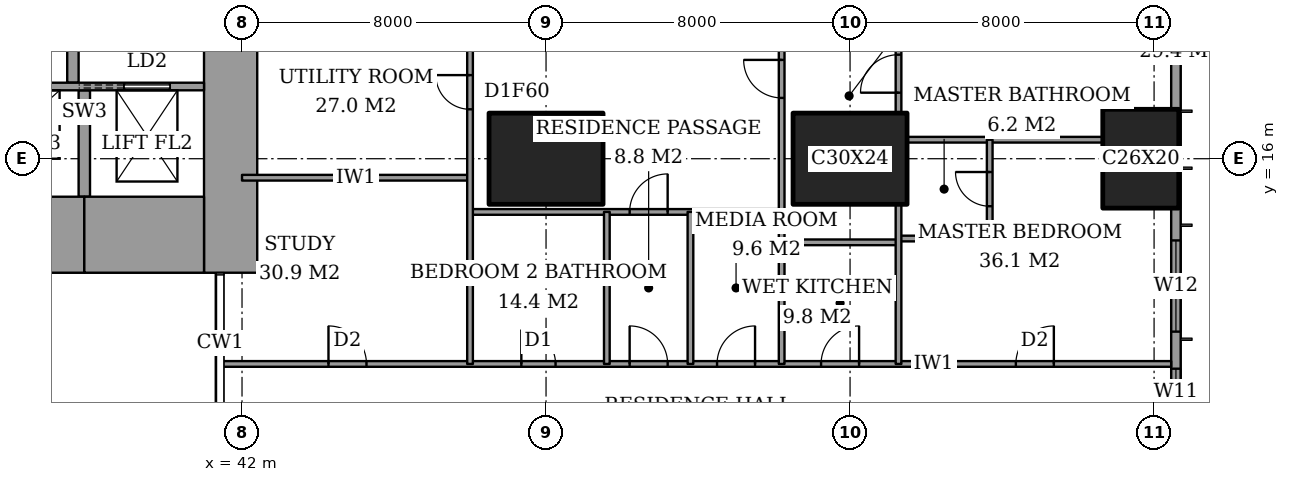
"""IFC4 building model, lengths in metres.
Left out: names, types, materials, properties, quantities, classifications, styles, units other than length and angle.
Written with IfcOpenShell. Run it as: python <this file> out.ifc"""

import sys

from ifc_helpers import new_model, si_unit, direction, frame, frame_2d, origin, origin_2d, place, context, subcontext, project, spatial, rectangle, extrude, element, fill, save


model = new_model("IFC4")
c1 = context("Model", 3, precision=1e-05, world=origin(), true_north=direction((0.0, 1.0)))
c2 = subcontext(c1, "Body", "Model", "MODEL_VIEW")
j1 = project(units=[si_unit("LENGTHUNIT", "METRE"), si_unit("PLANEANGLEUNIT", "RADIAN")], contexts=[c1])
p1 = place(None, origin())
s1 = spatial("IfcSite", under=j1, at=p1, CompositionType="ELEMENT")
p2 = place(p1, origin())
s2 = spatial("IfcBuilding", under=s1, at=p2, CompositionType="ELEMENT")
p3 = place(p2, frame((0.0, 0.0, 110.6)))
s3 = spatial("IfcBuildingStorey", under=s2, at=p3, CompositionType="ELEMENT", Elevation=110.6)
for number, where, z_axis, x_axis in (
    (1, (50.0, 16.0, 0.0), (0.0, 0.0, 1.0), (1.0, 0.0, 0.0)),
    (2, (58.0, 16.0, 0.0), (0.0, 0.0, 1.0), (1.0, 0.0, 0.0)),
):
    element("IfcColumn", number, at=place(p3, frame(where, z_axis=z_axis, x_axis=x_axis)), inside=s3, PredefinedType="COLUMN", context=c2, shape_type="SweptSolid", body=[
        extrude(rectangle(XDim=3.0, YDim=2.4, at=origin_2d()), origin(), (0.0, 0.0, 1.0), 3.6),
    ])
p4 = place(p3, frame((65.65, 16.0, 0.0), z_axis=(0.0, 0.0, 1.0), x_axis=(0.0, 1.0, 0.0)))
e3 = element("IfcColumn", 3, at=p4, inside=s3, PredefinedType="COLUMN", context=c2, shape_type="SweptSolid", body=[
    extrude(rectangle(XDim=2.6, YDim=2.0, at=origin_2d()), origin(), (0.0, 0.0, 1.0), 3.6),
])
p5 = place(p3, frame((28.15, 14.0, 0.0), z_axis=(0.0, 0.0, 1.0), x_axis=(1.0, 0.0, 0.0)))
e4 = element("IfcWall", 4, at=p5, inside=s3, PredefinedType="SHEAR", context=c2, shape_type="SweptSolid", body=[
    extrude(rectangle(XDim=9.7, YDim=2.0, at=frame_2d((4.85, 0.0))), origin(), (0.0, 0.0, 1.0), 3.6),
])
p6 = place(p3, frame((37.85, 14.0, 0.0), z_axis=(0.0, 0.0, 1.0), x_axis=(1.0, 0.0, 0.0)))
e5 = element("IfcWall", 5, at=p6, inside=s3, PredefinedType="SHEAR", context=c2, shape_type="SweptSolid", body=[
    extrude(rectangle(XDim=3.15, YDim=2.0, at=frame_2d((1.575, 0.0))), origin(), (0.0, 0.0, 1.0), 3.6),
])
p7 = place(p3, frame((41.7, 13.0, 0.0), z_axis=(0.0, 0.0, 1.0), x_axis=(0.0, 1.0, 0.0)))
e6 = element("IfcWall", 6, at=p7, inside=s3, PredefinedType="SHEAR", context=c2, shape_type="SweptSolid", body=[
    extrude(rectangle(XDim=11.85, YDim=1.4, at=frame_2d((5.925, 0.0))), origin(), (0.0, 0.0, 1.0), 3.6),
])
p8 = place(p7, frame((7.5, 0.0, 0.0)))
e7 = element("IfcOpeningElement", 7, at=p8, cuts=e6, PredefinedType="OPENING", context=c2, shape_type="SweptSolid", body=[
    extrude(rectangle(XDim=1.8, YDim=2.4, at=frame_2d((0.9, 1.2))), frame((0.0, 0.71, 0.0), z_axis=(0.0, -1.0, 0.0), x_axis=(1.0, 0.0, 0.0)), (0.0, 0.0, 1.0), 1.42),
])
p9 = place(p3, frame((37.55, 18.0, 0.0), z_axis=(0.0, 0.0, 1.0), x_axis=(0.0, 1.0, 0.0)))
e8 = element("IfcWall", 8, at=p9, inside=s3, PredefinedType="PARTITIONING", context=c2, shape_type="SweptSolid", body=[
    extrude(rectangle(XDim=6.7, YDim=0.3, at=frame_2d((3.35, 0.0))), origin(), (0.0, 0.0, 1.0), 3.6),
])
p10 = place(p9, frame((2.8, 0.0, 0.0)))
e9 = element("IfcOpeningElement", 9, at=p10, cuts=e8, PredefinedType="OPENING", context=c2, shape_type="SweptSolid", body=[
    extrude(rectangle(XDim=1.2, YDim=2.1, at=frame_2d((0.6, 1.05))), frame((0.0, 0.16, 0.0), z_axis=(0.0, -1.0, 0.0), x_axis=(1.0, 0.0, 0.0)), (0.0, 0.0, 1.0), 0.32),
])
p11 = place(p3, frame((66.575, 3.175, 0.0), z_axis=(0.0, 0.0, 1.0), x_axis=(0.0, 1.0, 0.0)))
e10 = element("IfcWall", 10, at=p11, inside=s3, PredefinedType="SOLIDWALL", context=c2, shape_type="SweptSolid", body=[
    extrude(rectangle(XDim=41.65, YDim=0.25, at=frame_2d((20.825, 0.0))), origin(), (0.0, 0.0, 1.0), 3.6),
])
p12 = place(p11, frame((0.775, 0.0, 0.4)))
e11 = element("IfcOpeningElement", 11, at=p12, cuts=e10, PredefinedType="OPENING", context=c2, shape_type="SweptSolid", body=[
    extrude(rectangle(XDim=2.4, YDim=2.2, at=frame_2d((1.2, 1.1))), frame((0.0, 0.135, 0.0), z_axis=(0.0, -1.0, 0.0), x_axis=(1.0, 0.0, 0.0)), (0.0, 0.0, 1.0), 0.27),
])
p13 = place(p11, frame((6.1, 0.0, 0.4)))
e12 = element("IfcOpeningElement", 12, at=p13, cuts=e10, PredefinedType="OPENING", context=c2, shape_type="SweptSolid", body=[
    extrude(rectangle(XDim=1.2, YDim=2.2, at=frame_2d((0.6, 1.1))), frame((0.0, 0.135, 0.0), z_axis=(0.0, -1.0, 0.0), x_axis=(1.0, 0.0, 0.0)), (0.0, 0.0, 1.0), 0.27),
])
p14 = place(p11, frame((8.275, 0.0, 0.4)))
e13 = element("IfcOpeningElement", 13, at=p14, cuts=e10, PredefinedType="OPENING", context=c2, shape_type="SweptSolid", body=[
    extrude(rectangle(XDim=2.4, YDim=2.2, at=frame_2d((1.2, 1.1))), frame((0.0, 0.135, 0.0), z_axis=(0.0, -1.0, 0.0), x_axis=(1.0, 0.0, 0.0)), (0.0, 0.0, 1.0), 0.27),
])
p15 = place(p11, frame((15.775, 0.0, 0.4)))
e14 = element("IfcOpeningElement", 14, at=p15, cuts=e10, PredefinedType="OPENING", context=c2, shape_type="SweptSolid", body=[
    extrude(rectangle(XDim=2.4, YDim=2.2, at=frame_2d((1.2, 1.1))), frame((0.0, 0.135, 0.0), z_axis=(0.0, -1.0, 0.0), x_axis=(1.0, 0.0, 0.0)), (0.0, 0.0, 1.0), 0.27),
])
p16 = place(p11, frame((23.475, 0.0, 0.4)))
e15 = element("IfcOpeningElement", 15, at=p16, cuts=e10, PredefinedType="OPENING", context=c2, shape_type="SweptSolid", body=[
    extrude(rectangle(XDim=2.4, YDim=2.2, at=frame_2d((1.2, 1.1))), frame((0.0, 0.135, 0.0), z_axis=(0.0, -1.0, 0.0), x_axis=(1.0, 0.0, 0.0)), (0.0, 0.0, 1.0), 0.27),
])
p17 = place(p11, frame((30.975, 0.0, 0.4)))
e16 = element("IfcOpeningElement", 16, at=p17, cuts=e10, PredefinedType="OPENING", context=c2, shape_type="SweptSolid", body=[
    extrude(rectangle(XDim=2.4, YDim=2.2, at=frame_2d((1.2, 1.1))), frame((0.0, 0.135, 0.0), z_axis=(0.0, -1.0, 0.0), x_axis=(1.0, 0.0, 0.0)), (0.0, 0.0, 1.0), 0.27),
])
p18 = place(p11, frame((34.5, 0.0, 0.4)))
e17 = element("IfcOpeningElement", 17, at=p18, cuts=e10, PredefinedType="OPENING", context=c2, shape_type="SweptSolid", body=[
    extrude(rectangle(XDim=1.2, YDim=2.2, at=frame_2d((0.6, 1.1))), frame((0.0, 0.135, 0.0), z_axis=(0.0, -1.0, 0.0), x_axis=(1.0, 0.0, 0.0)), (0.0, 0.0, 1.0), 0.27),
])
p19 = place(p11, frame((38.475, 0.0, 0.4)))
e18 = element("IfcOpeningElement", 18, at=p19, cuts=e10, PredefinedType="OPENING", context=c2, shape_type="SweptSolid", body=[
    extrude(rectangle(XDim=2.4, YDim=2.2, at=frame_2d((1.2, 1.1))), frame((0.0, 0.135, 0.0), z_axis=(0.0, -1.0, 0.0), x_axis=(1.0, 0.0, 0.0)), (0.0, 0.0, 1.0), 0.27),
])
p20 = place(p3, frame((41.439, 10.6, 0.0), z_axis=(0.0, 0.0, 1.0), x_axis=(1.0, 0.0, 0.0)))
e19 = element("IfcWall", 19, at=p20, inside=s3, PredefinedType="PARTITIONING", context=c2, shape_type="SweptSolid", body=[
    extrude(rectangle(XDim=25.011, YDim=0.15, at=frame_2d((12.505, 0.0))), origin(), (0.0, 0.0, 1.0), 3.35),
])
p21 = place(p20, frame((10.761, 0.0, 0.0)))
e20 = element("IfcOpeningElement", 20, at=p21, cuts=e19, PredefinedType="OPENING", context=c2, shape_type="SweptSolid", body=[
    extrude(rectangle(XDim=1.0, YDim=2.1, at=frame_2d((0.5, 1.05))), frame((0.0, 0.085, 0.0), z_axis=(0.0, -1.0, 0.0), x_axis=(1.0, 0.0, 0.0)), (0.0, 0.0, 1.0), 0.17),
])
p22 = place(p20, frame((20.924, 0.0, 0.0)))
e21 = element("IfcOpeningElement", 21, at=p22, cuts=e19, PredefinedType="OPENING", context=c2, shape_type="SweptSolid", body=[
    extrude(rectangle(XDim=1.0, YDim=2.1, at=frame_2d((0.5, 1.05))), frame((0.0, 0.085, 0.0), z_axis=(0.0, -1.0, 0.0), x_axis=(1.0, 0.0, 0.0)), (0.0, 0.0, 1.0), 0.17),
])
p23 = place(p20, frame((15.799, 0.0, 0.0)))
e22 = element("IfcOpeningElement", 22, at=p23, cuts=e19, PredefinedType="OPENING", context=c2, shape_type="SweptSolid", body=[
    extrude(rectangle(XDim=1.0, YDim=2.1, at=frame_2d((0.5, 1.05))), frame((0.0, 0.085, 0.0), z_axis=(0.0, -1.0, 0.0), x_axis=(1.0, 0.0, 0.0)), (0.0, 0.0, 1.0), 0.17),
])
p24 = place(p20, frame((13.061, 0.0, 0.0)))
e23 = element("IfcOpeningElement", 23, at=p24, cuts=e19, PredefinedType="OPENING", context=c2, shape_type="SweptSolid", body=[
    extrude(rectangle(XDim=1.0, YDim=2.1, at=frame_2d((0.5, 1.05))), frame((0.0, 0.085, 0.0), z_axis=(0.0, -1.0, 0.0), x_axis=(1.0, 0.0, 0.0)), (0.0, 0.0, 1.0), 0.17),
])
p25 = place(p20, frame((7.911, 0.0, 0.0)))
e24 = element("IfcOpeningElement", 24, at=p25, cuts=e19, PredefinedType="OPENING", context=c2, shape_type="SweptSolid", body=[
    extrude(rectangle(XDim=0.9, YDim=2.1, at=frame_2d((0.45, 1.05))), frame((0.0, 0.085, 0.0), z_axis=(0.0, -1.0, 0.0), x_axis=(1.0, 0.0, 0.0)), (0.0, 0.0, 1.0), 0.17),
])
p26 = place(p20, frame((2.836, 0.0, 0.0)))
e25 = element("IfcOpeningElement", 25, at=p26, cuts=e19, PredefinedType="OPENING", context=c2, shape_type="SweptSolid", body=[
    extrude(rectangle(XDim=1.0, YDim=2.1, at=frame_2d((0.5, 1.05))), frame((0.0, 0.085, 0.0), z_axis=(0.0, -1.0, 0.0), x_axis=(1.0, 0.0, 0.0)), (0.0, 0.0, 1.0), 0.17),
])
p27 = place(p3, frame((56.2, 13.8, 0.0), z_axis=(0.0, 0.0, 1.0), x_axis=(1.0, 0.0, 0.0)))
e26 = element("IfcWall", 26, at=p27, inside=s3, PredefinedType="PARTITIONING", context=c2, shape_type="SweptSolid", body=[
    extrude(rectangle(XDim=3.075, YDim=0.15, at=frame_2d((1.538, 0.0))), origin(), (0.0, 0.0, 1.0), 3.35),
])
p28 = place(p3, frame((59.275, 13.9, 0.0), z_axis=(0.0, 0.0, 1.0), x_axis=(1.0, 0.0, 0.0)))
e27 = element("IfcWall", 27, at=p28, inside=s3, PredefinedType="PARTITIONING", context=c2, shape_type="SweptSolid", body=[
    extrude(rectangle(XDim=2.4, YDim=0.15, at=frame_2d((1.2, 0.0))), origin(), (0.0, 0.0, 1.0), 3.35),
])
p29 = place(p3, frame((48.0, 14.6, 0.0), z_axis=(0.0, 0.0, 1.0), x_axis=(1.0, 0.0, 0.0)))
e28 = element("IfcWall", 28, at=p29, inside=s3, PredefinedType="PARTITIONING", context=c2, shape_type="SweptSolid", body=[
    extrude(rectangle(XDim=8.2, YDim=0.15, at=frame_2d((4.1, 0.0))), origin(), (0.0, 0.0, 1.0), 3.35),
])
p30 = place(p29, frame((4.2, 0.0, 0.0)))
e29 = element("IfcOpeningElement", 29, at=p30, cuts=e28, PredefinedType="OPENING", context=c2, shape_type="SweptSolid", body=[
    extrude(rectangle(XDim=1.0, YDim=2.1, at=frame_2d((0.5, 1.05))), frame((0.0, 0.085, 0.0), z_axis=(0.0, -1.0, 0.0), x_axis=(1.0, 0.0, 0.0)), (0.0, 0.0, 1.0), 0.17),
])
p31 = place(p3, frame((42.0, 15.5, 0.0), z_axis=(0.0, 0.0, 1.0), x_axis=(1.0, 0.0, 0.0)))
e30 = element("IfcWall", 30, at=p31, inside=s3, PredefinedType="PARTITIONING", context=c2, shape_type="SweptSolid", body=[
    extrude(rectangle(XDim=6.0, YDim=0.15, at=frame_2d((3.0, 0.0))), origin(), (0.0, 0.0, 1.0), 3.35),
])
p32 = place(p3, frame((59.5, 16.5, 0.0), z_axis=(0.0, 0.0, 1.0), x_axis=(1.0, 0.0, 0.0)))
e31 = element("IfcWall", 31, at=p32, inside=s3, PredefinedType="PARTITIONING", context=c2, shape_type="SweptSolid", body=[
    extrude(rectangle(XDim=5.15, YDim=0.15, at=frame_2d((2.575, 0.0))), origin(), (0.0, 0.0, 1.0), 3.35),
])
p33 = place(p3, frame((48.0, 10.6, 0.0), z_axis=(0.0, 0.0, 1.0), x_axis=(0.0, 1.0, 0.0)))
e32 = element("IfcWall", 32, at=p33, inside=s3, PredefinedType="PARTITIONING", context=c2, shape_type="SweptSolid", body=[
    extrude(rectangle(XDim=13.4, YDim=0.15, at=frame_2d((6.7, 0.0))), origin(), (0.0, 0.0, 1.0), 3.35),
])
p34 = place(p33, frame((10.8, 0.0, 0.0)))
e33 = element("IfcOpeningElement", 33, at=p34, cuts=e32, PredefinedType="OPENING", context=c2, shape_type="SweptSolid", body=[
    extrude(rectangle(XDim=1.2, YDim=2.4, at=frame_2d((0.6, 1.2))), frame((0.0, 0.085, 0.0), z_axis=(0.0, -1.0, 0.0), x_axis=(1.0, 0.0, 0.0)), (0.0, 0.0, 1.0), 0.17),
])
p35 = place(p33, frame((6.7, 0.0, 0.0)))
e34 = element("IfcOpeningElement", 34, at=p35, cuts=e32, PredefinedType="OPENING", context=c2, shape_type="SweptSolid", body=[
    extrude(rectangle(XDim=0.9, YDim=2.1, at=frame_2d((0.45, 1.05))), frame((0.0, 0.085, 0.0), z_axis=(0.0, -1.0, 0.0), x_axis=(1.0, 0.0, 0.0)), (0.0, 0.0, 1.0), 0.17),
])
for number, where, z_axis, x_axis in (
    (35, (51.6, 10.6, 0.0), (0.0, 0.0, 1.0), (0.0, 1.0, 0.0)),
    (36, (53.8, 10.6, 0.0), (0.0, 0.0, 1.0), (0.0, 1.0, 0.0)),
):
    element("IfcWall", number, at=place(p3, frame(where, z_axis=z_axis, x_axis=x_axis)), inside=s3, PredefinedType="PARTITIONING", context=c2, shape_type="SweptSolid", body=[
        extrude(rectangle(XDim=4.0, YDim=0.15, at=frame_2d((2.0, 0.0))), origin(), (0.0, 0.0, 1.0), 3.35),
    ])
p36 = place(p3, frame((56.2, 10.6, 0.0), z_axis=(0.0, 0.0, 1.0), x_axis=(0.0, 1.0, 0.0)))
e37 = element("IfcWall", 37, at=p36, inside=s3, PredefinedType="PARTITIONING", context=c2, shape_type="SweptSolid", body=[
    extrude(rectangle(XDim=11.0, YDim=0.15, at=frame_2d((5.5, 0.0))), origin(), (0.0, 0.0, 1.0), 3.35),
])
p37 = place(p36, frame((7.0, 0.0, 0.0)))
e38 = element("IfcOpeningElement", 38, at=p37, cuts=e37, PredefinedType="OPENING", context=c2, shape_type="SweptSolid", body=[
    extrude(rectangle(XDim=1.0, YDim=2.1, at=frame_2d((0.5, 1.05))), frame((0.0, 0.085, 0.0), z_axis=(0.0, -1.0, 0.0), x_axis=(1.0, 0.0, 0.0)), (0.0, 0.0, 1.0), 0.17),
])
p38 = place(p3, frame((59.275, 10.6, 0.0), z_axis=(0.0, 0.0, 1.0), x_axis=(0.0, 1.0, 0.0)))
e39 = element("IfcWall", 39, at=p38, inside=s3, PredefinedType="PARTITIONING", context=c2, shape_type="SweptSolid", body=[
    extrude(rectangle(XDim=4.2, YDim=0.15, at=frame_2d((2.1, 0.0))), origin(), (0.0, 0.0, 1.0), 3.35),
])
p39 = place(p3, frame((59.275, 17.2, 0.0), z_axis=(0.0, 0.0, 1.0), x_axis=(0.0, 1.0, 0.0)))
e40 = element("IfcWall", 40, at=p39, inside=s3, PredefinedType="PARTITIONING", context=c2, shape_type="SweptSolid", body=[
    extrude(rectangle(XDim=2.45, YDim=0.15, at=frame_2d((1.225, 0.0))), origin(), (0.0, 0.0, 1.0), 3.35),
])
p40 = place(p39, frame((0.538, 0.0, 0.0)))
e41 = element("IfcOpeningElement", 41, at=p40, cuts=e40, PredefinedType="OPENING", context=c2, shape_type="SweptSolid", body=[
    extrude(rectangle(XDim=1.0, YDim=2.1, at=frame_2d((0.5, 1.05))), frame((0.0, 0.085, 0.0), z_axis=(0.0, -1.0, 0.0), x_axis=(1.0, 0.0, 0.0)), (0.0, 0.0, 1.0), 0.17),
])
p41 = place(p3, frame((61.675, 13.9, 0.0), z_axis=(0.0, 0.0, 1.0), x_axis=(0.0, 1.0, 0.0)))
e42 = element("IfcWall", 42, at=p41, inside=s3, PredefinedType="PARTITIONING", context=c2, shape_type="SweptSolid", body=[
    extrude(rectangle(XDim=2.6, YDim=0.15, at=frame_2d((1.3, 0.0))), origin(), (0.0, 0.0, 1.0), 3.35),
])
p42 = place(p41, frame((0.85, 0.0, 0.0)))
e43 = element("IfcOpeningElement", 43, at=p42, cuts=e42, PredefinedType="OPENING", context=c2, shape_type="SweptSolid", body=[
    extrude(rectangle(XDim=0.9, YDim=2.1, at=frame_2d((0.45, 1.05))), frame((0.0, 0.085, 0.0), z_axis=(0.0, -1.0, 0.0), x_axis=(1.0, 0.0, 0.0)), (0.0, 0.0, 1.0), 0.17),
])
p43 = place(p3, frame((28.3, 17.9, 0.0), z_axis=(0.0, 0.0, 1.0), x_axis=(1.0, 0.0, 0.0)))
e44 = element("IfcWall", 44, at=p43, inside=s3, PredefinedType="PARTITIONING", context=c2, shape_type="SweptSolid", body=[
    extrude(rectangle(XDim=12.7, YDim=0.2, at=frame_2d((6.35, 0.0))), origin(), (0.0, 0.0, 1.0), 3.6),
])
p44 = place(p43, frame((0.95, 0.0, 0.0)))
e45 = element("IfcOpeningElement", 45, at=p44, cuts=e44, PredefinedType="OPENING", context=c2, shape_type="SweptSolid", body=[
    extrude(rectangle(XDim=1.1, YDim=2.1, at=frame_2d((0.55, 1.05))), frame((0.0, 0.11, 0.0), z_axis=(0.0, -1.0, 0.0), x_axis=(1.0, 0.0, 0.0)), (0.0, 0.0, 1.0), 0.22),
])
p45 = place(p43, frame((4.15, 0.0, 0.0)))
e46 = element("IfcOpeningElement", 46, at=p45, cuts=e44, PredefinedType="OPENING", context=c2, shape_type="SweptSolid", body=[
    extrude(rectangle(XDim=1.1, YDim=2.1, at=frame_2d((0.55, 1.05))), frame((0.0, 0.11, 0.0), z_axis=(0.0, -1.0, 0.0), x_axis=(1.0, 0.0, 0.0)), (0.0, 0.0, 1.0), 0.22),
])
p46 = place(p43, frame((7.35, 0.0, 0.0)))
e47 = element("IfcOpeningElement", 47, at=p46, cuts=e44, PredefinedType="OPENING", context=c2, shape_type="SweptSolid", body=[
    extrude(rectangle(XDim=1.1, YDim=2.1, at=frame_2d((0.55, 1.05))), frame((0.0, 0.11, 0.0), z_axis=(0.0, -1.0, 0.0), x_axis=(1.0, 0.0, 0.0)), (0.0, 0.0, 1.0), 0.22),
])
p47 = place(p43, frame((10.6, 0.0, 0.0)))
e48 = element("IfcOpeningElement", 48, at=p47, cuts=e44, PredefinedType="OPENING", context=c2, shape_type="SweptSolid", body=[
    extrude(rectangle(XDim=1.2, YDim=2.1, at=frame_2d((0.6, 1.05))), frame((0.0, 0.11, 0.0), z_axis=(0.0, -1.0, 0.0), x_axis=(1.0, 0.0, 0.0)), (0.0, 0.0, 1.0), 0.22),
])
p48 = place(p3, frame((37.85, 15.0, 0.0), z_axis=(0.0, 0.0, 1.0), x_axis=(0.0, 1.0, 0.0)))
e49 = element("IfcWall", 49, at=p48, inside=s3, PredefinedType="SHEAR", context=c2, shape_type="SweptSolid", body=[
    extrude(rectangle(XDim=2.8, YDim=0.3, at=frame_2d((1.4, 0.0))), origin(), (0.0, 0.0, 1.0), 3.6),
])
p49 = place(p13, origin())
e50 = element("IfcWindow", 50, at=p49, inside=s3, PartitioningType="SINGLE_PANEL", PredefinedType="WINDOW", context=c2, shape_type="SweptSolid", body=[
    extrude(rectangle(XDim=1.2, YDim=2.2, at=frame_2d((0.6, 1.1))), frame((0.0, 0.03, 0.0), z_axis=(0.0, -1.0, 0.0), x_axis=(1.0, 0.0, 0.0)), (0.0, 0.0, 1.0), 0.06),
])
fill(e12, e50)
p50 = place(p14, origin())
e51 = element("IfcWindow", 51, at=p50, inside=s3, PartitioningType="SINGLE_PANEL", PredefinedType="WINDOW", context=c2, shape_type="SweptSolid", body=[
    extrude(rectangle(XDim=2.4, YDim=2.2, at=frame_2d((1.2, 1.1))), frame((0.0, 0.03, 0.0), z_axis=(0.0, -1.0, 0.0), x_axis=(1.0, 0.0, 0.0)), (0.0, 0.0, 1.0), 0.06),
])
fill(e13, e51)
p51 = place(p21, origin())
e52 = element("IfcDoor", 52, at=p51, inside=s3, OperationType="SINGLE_SWING_RIGHT", PredefinedType="DOOR", context=c2, shape_type="SweptSolid", body=[
    extrude(rectangle(XDim=1.0, YDim=2.1, at=frame_2d((0.5, 1.05))), frame((0.0, 0.025, 0.0), z_axis=(0.0, -1.0, 0.0), x_axis=(1.0, 0.0, 0.0)), (0.0, 0.0, 1.0), 0.05),
])
fill(e20, e52)
p52 = place(p42, origin())
e53 = element("IfcDoor", 53, at=p52, inside=s3, OperationType="SINGLE_SWING_LEFT", PredefinedType="DOOR", context=c2, shape_type="SweptSolid", body=[
    extrude(rectangle(XDim=0.9, YDim=2.1, at=frame_2d((0.45, 1.05))), frame((0.0, 0.025, 0.0), z_axis=(0.0, -1.0, 0.0), x_axis=(1.0, 0.0, 0.0)), (0.0, 0.0, 1.0), 0.05),
])
fill(e43, e53)
p53 = place(p22, origin())
e54 = element("IfcDoor", 54, at=p53, inside=s3, OperationType="SINGLE_SWING_LEFT", PredefinedType="DOOR", context=c2, shape_type="SweptSolid", body=[
    extrude(rectangle(XDim=1.0, YDim=2.1, at=frame_2d((0.5, 1.05))), frame((0.0, 0.025, 0.0), z_axis=(0.0, -1.0, 0.0), x_axis=(1.0, 0.0, 0.0)), (0.0, 0.0, 1.0), 0.05),
])
fill(e21, e54)
p54 = place(p40, origin())
e55 = element("IfcDoor", 55, at=p54, inside=s3, OperationType="SINGLE_SWING_RIGHT", PredefinedType="DOOR", context=c2, shape_type="SweptSolid", body=[
    extrude(rectangle(XDim=1.0, YDim=2.1, at=frame_2d((0.5, 1.05))), frame((0.0, 0.025, 0.0), z_axis=(0.0, -1.0, 0.0), x_axis=(1.0, 0.0, 0.0)), (0.0, 0.0, 1.0), 0.05),
])
fill(e41, e55)
p55 = place(p23, origin())
e56 = element("IfcDoor", 56, at=p55, inside=s3, OperationType="SINGLE_SWING_LEFT", PredefinedType="DOOR", context=c2, shape_type="SweptSolid", body=[
    extrude(rectangle(XDim=1.0, YDim=2.1, at=frame_2d((0.5, 1.05))), frame((0.0, 0.025, 0.0), z_axis=(0.0, -1.0, 0.0), x_axis=(1.0, 0.0, 0.0)), (0.0, 0.0, 1.0), 0.05),
])
fill(e22, e56)
p56 = place(p37, origin())
e57 = element("IfcDoor", 57, at=p56, inside=s3, OperationType="SINGLE_SWING_LEFT", PredefinedType="DOOR", context=c2, shape_type="SweptSolid", body=[
    extrude(rectangle(XDim=1.0, YDim=2.1, at=frame_2d((0.5, 1.05))), frame((0.0, 0.025, 0.0), z_axis=(0.0, -1.0, 0.0), x_axis=(1.0, 0.0, 0.0)), (0.0, 0.0, 1.0), 0.05),
])
fill(e38, e57)
p57 = place(p24, origin())
e58 = element("IfcDoor", 58, at=p57, inside=s3, OperationType="SINGLE_SWING_LEFT", PredefinedType="DOOR", context=c2, shape_type="SweptSolid", body=[
    extrude(rectangle(XDim=1.0, YDim=2.1, at=frame_2d((0.5, 1.05))), frame((0.0, 0.025, 0.0), z_axis=(0.0, -1.0, 0.0), x_axis=(1.0, 0.0, 0.0)), (0.0, 0.0, 1.0), 0.05),
])
fill(e23, e58)
p58 = place(p30, origin())
e59 = element("IfcDoor", 59, at=p58, inside=s3, OperationType="SINGLE_SWING_LEFT", PredefinedType="DOOR", context=c2, shape_type="SweptSolid", body=[
    extrude(rectangle(XDim=1.0, YDim=2.1, at=frame_2d((0.5, 1.05))), frame((0.0, 0.025, 0.0), z_axis=(0.0, -1.0, 0.0), x_axis=(1.0, 0.0, 0.0)), (0.0, 0.0, 1.0), 0.05),
])
fill(e29, e59)
p59 = place(p25, origin())
e60 = element("IfcDoor", 60, at=p59, inside=s3, OperationType="SINGLE_SWING_RIGHT", PredefinedType="DOOR", context=c2, shape_type="SweptSolid", body=[
    extrude(rectangle(XDim=0.9, YDim=2.1, at=frame_2d((0.45, 1.05))), frame((0.0, 0.025, 0.0), z_axis=(0.0, -1.0, 0.0), x_axis=(1.0, 0.0, 0.0)), (0.0, 0.0, 1.0), 0.05),
])
fill(e24, e60)
p60 = place(p26, origin())
e61 = element("IfcDoor", 61, at=p60, inside=s3, OperationType="SINGLE_SWING_RIGHT", PredefinedType="DOOR", context=c2, shape_type="SweptSolid", body=[
    extrude(rectangle(XDim=1.0, YDim=2.1, at=frame_2d((0.5, 1.05))), frame((0.0, 0.025, 0.0), z_axis=(0.0, -1.0, 0.0), x_axis=(1.0, 0.0, 0.0)), (0.0, 0.0, 1.0), 0.05),
])
fill(e25, e61)
p61 = place(p35, origin())
e62 = element("IfcDoor", 62, at=p61, inside=s3, OperationType="SINGLE_SWING_LEFT", PredefinedType="DOOR", context=c2, shape_type="SweptSolid", body=[
    extrude(rectangle(XDim=0.9, YDim=2.1, at=frame_2d((0.45, 1.05))), frame((0.0, 0.025, 0.0), z_axis=(0.0, -1.0, 0.0), x_axis=(1.0, 0.0, 0.0)), (0.0, 0.0, 1.0), 0.05),
])
fill(e34, e62)
p62 = place(p47, origin())
e63 = element("IfcDoor", 63, at=p62, inside=s3, OperationType="SLIDING_TO_LEFT", PredefinedType="DOOR", context=c2, shape_type="SweptSolid", body=[
    extrude(rectangle(XDim=1.2, YDim=2.1, at=frame_2d((0.6, 1.05))), frame((0.0, 0.025, 0.0), z_axis=(0.0, -1.0, 0.0), x_axis=(1.0, 0.0, 0.0)), (0.0, 0.0, 1.0), 0.05),
])
fill(e48, e63)
save(model, sys.argv[1])
